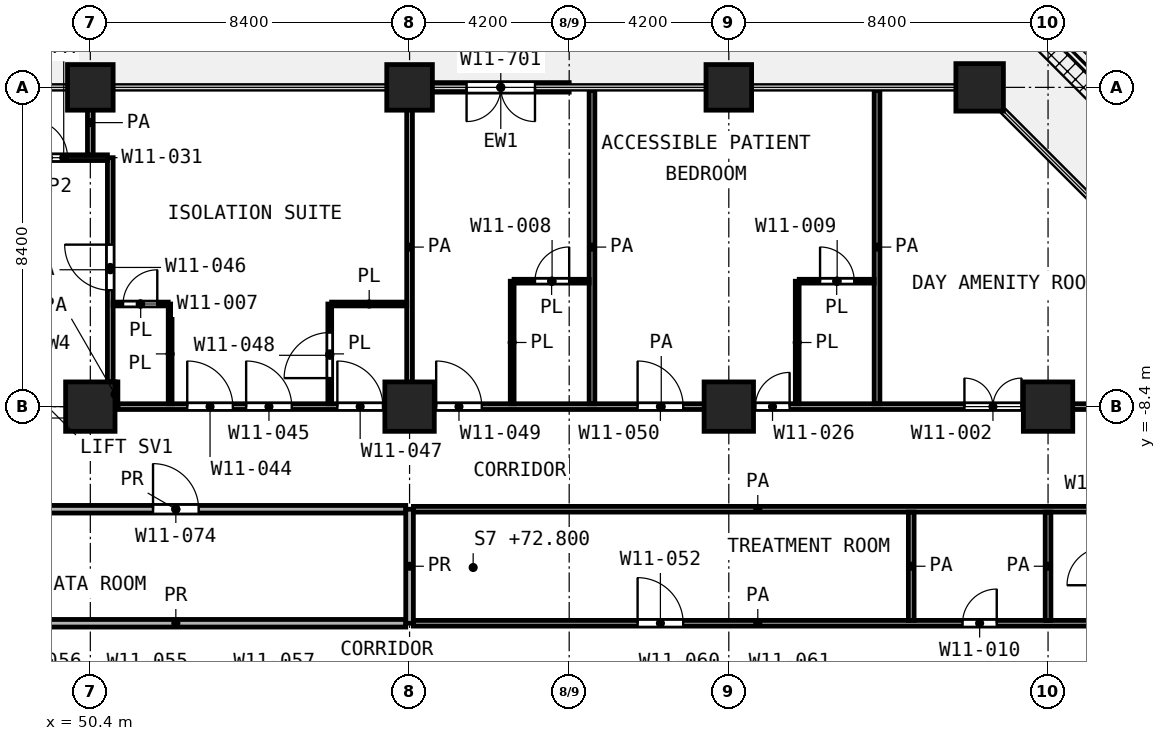
"""IFC4 building model, lengths in metres.
Left out: names, types, materials, properties, quantities, classifications, styles, units other than length and angle.
Written with IfcOpenShell. Run it as: python <this file> out.ifc"""

import sys

from ifc_helpers import new_model, si_unit, direction, frame, frame_2d, origin, origin_2d, place, context, subcontext, project, spatial, rectangle, extrude, element, fill, save


model = new_model("IFC4")
c1 = context("Model", 3, precision=1e-05, world=origin(), true_north=direction((0.0, 1.0)))
c2 = subcontext(c1, "Body", "Model", "MODEL_VIEW")
j1 = project(units=[si_unit("LENGTHUNIT", "METRE"), si_unit("PLANEANGLEUNIT", "RADIAN")], contexts=[c1])
p1 = place(None, origin())
s1 = spatial("IfcSite", under=j1, at=p1, CompositionType="ELEMENT")
p2 = place(p1, origin())
s2 = spatial("IfcBuilding", under=s1, at=p2, CompositionType="ELEMENT")
p3 = place(p2, frame((0.0, 0.0, 72.8)))
s3 = spatial("IfcBuildingStorey", under=s2, at=p3, CompositionType="ELEMENT", Elevation=72.8)
for number, where, z_axis, x_axis in (
    (1, (50.4, 0.0, 0.0), (0.0, 0.0, 1.0), (1.0, 0.0, 0.0)),
    (2, (58.8, 0.0, 0.0), (0.0, 0.0, 1.0), (1.0, 0.0, 0.0)),
    (3, (67.2, 0.0, 0.0), (0.0, 0.0, 1.0), (1.0, 0.0, 0.0)),
):
    element("IfcColumn", number, at=place(p3, frame(where, z_axis=z_axis, x_axis=x_axis)), inside=s3, PredefinedType="COLUMN", context=c2, shape_type="SweptSolid", body=[
        extrude(rectangle(XDim=1.2, YDim=1.2, at=origin_2d()), origin(), (0.0, 0.0, 1.0), 4.2),
    ])
p4 = place(p3, frame((73.8, 0.0, 0.0), z_axis=(0.0, 0.0, 1.0), x_axis=(1.0, 0.0, 0.0)))
e4 = element("IfcColumn", 4, at=p4, inside=s3, PredefinedType="COLUMN", context=c2, shape_type="SweptSolid", body=[
    extrude(rectangle(XDim=1.25, YDim=1.25, at=origin_2d()), origin(), (0.0, 0.0, 1.0), 4.2),
])
for number, where, z_axis, x_axis in (
    (5, (50.4, -8.4, 0.0), (0.0, 0.0, 1.0), (1.0, 0.0, 0.0)),
    (6, (58.8, -8.4, 0.0), (0.0, 0.0, 1.0), (1.0, 0.0, 0.0)),
    (7, (67.2, -8.4, 0.0), (0.0, 0.0, 1.0), (1.0, 0.0, 0.0)),
    (8, (75.6, -8.4, 0.0), (0.0, 0.0, 1.0), (1.0, 0.0, 0.0)),
):
    element("IfcColumn", number, at=place(p3, frame(where, z_axis=z_axis, x_axis=x_axis)), inside=s3, PredefinedType="COLUMN", context=c2, shape_type="SweptSolid", body=[
        extrude(rectangle(XDim=1.3, YDim=1.3, at=origin_2d()), origin(), (0.0, 0.0, 1.0), 4.2),
    ])
p5 = place(p3, frame((63.0, 0.0, 0.0), z_axis=(0.0, 0.0, 1.0), x_axis=(-1.0, 0.0, 0.0)))
e9 = element("IfcWall", 9, at=p5, inside=s3, PredefinedType="SOLIDWALL", context=c2, shape_type="SweptSolid", body=[
    extrude(rectangle(XDim=3.6, YDim=0.25, at=frame_2d((1.8, 0.0))), origin(), (0.0, 0.0, 1.0), 3.78),
])
p6 = place(p5, frame((0.9, 0.0, 0.0)))
e10 = element("IfcOpeningElement", 10, at=p6, cuts=e9, PredefinedType="OPENING", context=c2, shape_type="SweptSolid", body=[
    extrude(rectangle(XDim=1.8, YDim=2.1, at=frame_2d((0.9, 1.05))), frame((0.0, 0.135, 0.0), z_axis=(0.0, -1.0, 0.0), x_axis=(1.0, 0.0, 0.0)), (0.0, 0.0, 1.0), 0.27),
])
p7 = place(p3, frame((51.0, -5.7, 0.0), z_axis=(0.0, 0.0, 1.0), x_axis=(1.0, 0.0, 0.0)))
e11 = element("IfcWall", 11, at=p7, inside=s3, PredefinedType="PARTITIONING", context=c2, shape_type="SweptSolid", body=[
    extrude(rectangle(XDim=1.45, YDim=0.1, at=frame_2d((0.725, 0.0))), origin(), (0.0, 0.0, 1.0), 3.9),
])
p8 = place(p7, frame((0.262, 0.0, 0.0)))
e12 = element("IfcOpeningElement", 12, at=p8, cuts=e11, PredefinedType="OPENING", context=c2, shape_type="SweptSolid", body=[
    extrude(rectangle(XDim=0.9, YDim=2.1, at=frame_2d((0.45, 1.05))), frame((0.0, 0.06, 0.0), z_axis=(0.0, -1.0, 0.0), x_axis=(1.0, 0.0, 0.0)), (0.0, 0.0, 1.0), 0.12),
])
p9 = place(p3, frame((56.75, -5.7, 0.0), z_axis=(0.0, 0.0, 1.0), x_axis=(1.0, 0.0, 0.0)))
e13 = element("IfcWall", 13, at=p9, inside=s3, PredefinedType="PARTITIONING", context=c2, shape_type="SweptSolid", body=[
    extrude(rectangle(XDim=1.975, YDim=0.1, at=frame_2d((0.988, 0.0))), origin(), (0.0, 0.0, 1.0), 3.9),
])
p10 = place(p3, frame((61.55, -5.1, 0.0), z_axis=(0.0, 0.0, 1.0), x_axis=(1.0, 0.0, 0.0)))
e14 = element("IfcWall", 14, at=p10, inside=s3, PredefinedType="PARTITIONING", context=c2, shape_type="SweptSolid", body=[
    extrude(rectangle(XDim=1.975, YDim=0.1, at=frame_2d((0.987, 0.0))), origin(), (0.0, 0.0, 1.0), 3.9),
])
p11 = place(p10, frame((0.55, 0.0, 0.0)))
e15 = element("IfcOpeningElement", 15, at=p11, cuts=e14, PredefinedType="OPENING", context=c2, shape_type="SweptSolid", body=[
    extrude(rectangle(XDim=0.9, YDim=2.1, at=frame_2d((0.45, 1.05))), frame((0.0, 0.06, 0.0), z_axis=(0.0, -1.0, 0.0), x_axis=(1.0, 0.0, 0.0)), (0.0, 0.0, 1.0), 0.12),
])
p12 = place(p3, frame((69.052, -5.1, 0.0), z_axis=(0.0, 0.0, 1.0), x_axis=(1.0, 0.0, 0.0)))
e16 = element("IfcWall", 16, at=p12, inside=s3, PredefinedType="PARTITIONING", context=c2, shape_type="SweptSolid", body=[
    extrude(rectangle(XDim=1.973, YDim=0.1, at=frame_2d((0.986, 0.0))), origin(), (0.0, 0.0, 1.0), 3.9),
])
p13 = place(p12, frame((0.549, 0.0, 0.0)))
e17 = element("IfcOpeningElement", 17, at=p13, cuts=e16, PredefinedType="OPENING", context=c2, shape_type="SweptSolid", body=[
    extrude(rectangle(XDim=0.9, YDim=2.1, at=frame_2d((0.45, 1.05))), frame((0.0, 0.06, 0.0), z_axis=(0.0, -1.0, 0.0), x_axis=(1.0, 0.0, 0.0)), (0.0, 0.0, 1.0), 0.12),
])
p14 = place(p3, frame((52.5, -8.325, 0.0), z_axis=(0.0, 0.0, 1.0), x_axis=(0.0, 1.0, 0.0)))
e18 = element("IfcWall", 18, at=p14, inside=s3, PredefinedType="PARTITIONING", context=c2, shape_type="SweptSolid", body=[
    extrude(rectangle(XDim=2.625, YDim=0.1, at=frame_2d((1.312, 0.0))), origin(), (0.0, 0.0, 1.0), 3.9),
])
p15 = place(p3, frame((56.7, -8.325, 0.0), z_axis=(0.0, 0.0, 1.0), x_axis=(0.0, 1.0, 0.0)))
e19 = element("IfcWall", 19, at=p15, inside=s3, PredefinedType="PARTITIONING", context=c2, shape_type="SweptSolid", body=[
    extrude(rectangle(XDim=2.625, YDim=0.1, at=frame_2d((1.312, 0.0))), origin(), (0.0, 0.0, 1.0), 3.9),
])
p16 = place(p15, frame((0.675, 0.0, 0.0)))
e20 = element("IfcOpeningElement", 20, at=p16, cuts=e19, PredefinedType="OPENING", context=c2, shape_type="SweptSolid", body=[
    extrude(rectangle(XDim=1.2, YDim=2.1, at=frame_2d((0.6, 1.05))), frame((0.0, 0.06, 0.0), z_axis=(0.0, -1.0, 0.0), x_axis=(1.0, 0.0, 0.0)), (0.0, 0.0, 1.0), 0.12),
])
p17 = place(p3, frame((61.5, -8.325, 0.0), z_axis=(0.0, 0.0, 1.0), x_axis=(0.0, 1.0, 0.0)))
e21 = element("IfcWall", 21, at=p17, inside=s3, PredefinedType="PARTITIONING", context=c2, shape_type="SweptSolid", body=[
    extrude(rectangle(XDim=3.225, YDim=0.1, at=frame_2d((1.612, 0.0))), origin(), (0.0, 0.0, 1.0), 3.9),
])
p18 = place(p3, frame((69.0, -8.325, 0.0), z_axis=(0.0, 0.0, 1.0), x_axis=(0.0, 1.0, 0.0)))
e22 = element("IfcWall", 22, at=p18, inside=s3, PredefinedType="PARTITIONING", context=c2, shape_type="SweptSolid", body=[
    extrude(rectangle(XDim=3.224, YDim=0.1, at=frame_2d((1.612, 0.0))), origin(), (0.0, 0.0, 1.0), 3.9),
])
p19 = place(p3, frame((58.9, -14.1, 0.0), z_axis=(0.0, 0.0, 1.0), x_axis=(1.0, 0.0, 0.0)))
e23 = element("IfcWall", 23, at=p19, inside=s3, PredefinedType="PARTITIONING", context=c2, shape_type="SweptSolid", body=[
    extrude(rectangle(XDim=18.125, YDim=0.15, at=frame_2d((9.062, 0.0))), origin(), (0.0, 0.0, 1.0), 3.9),
])
p20 = place(p19, frame((5.9, 0.0, 0.0)))
e24 = element("IfcOpeningElement", 24, at=p20, cuts=e23, PredefinedType="OPENING", context=c2, shape_type="SweptSolid", body=[
    extrude(rectangle(XDim=1.2, YDim=2.1, at=frame_2d((0.6, 1.05))), frame((0.0, 0.085, 0.0), z_axis=(0.0, -1.0, 0.0), x_axis=(1.0, 0.0, 0.0)), (0.0, 0.0, 1.0), 0.17),
])
p21 = place(p19, frame((14.45, 0.0, 0.0)))
e25 = element("IfcOpeningElement", 25, at=p21, cuts=e23, PredefinedType="OPENING", context=c2, shape_type="SweptSolid", body=[
    extrude(rectangle(XDim=0.9, YDim=2.1, at=frame_2d((0.45, 1.05))), frame((0.0, 0.085, 0.0), z_axis=(0.0, -1.0, 0.0), x_axis=(1.0, 0.0, 0.0)), (0.0, 0.0, 1.0), 0.17),
])
p22 = place(p3, frame((58.9, -11.1, 0.0), z_axis=(0.0, 0.0, 1.0), x_axis=(1.0, 0.0, 0.0)))
e26 = element("IfcWall", 26, at=p22, inside=s3, PredefinedType="PARTITIONING", context=c2, shape_type="SweptSolid", body=[
    extrude(rectangle(XDim=18.125, YDim=0.15, at=frame_2d((9.062, 0.0))), origin(), (0.0, 0.0, 1.0), 3.9),
])
p23 = place(p3, frame((51.125, -8.4, 0.0), z_axis=(0.0, 0.0, 1.0), x_axis=(1.0, 0.0, 0.0)))
e27 = element("IfcWall", 27, at=p23, inside=s3, PredefinedType="PARTITIONING", context=c2, shape_type="SweptSolid", body=[
    extrude(rectangle(XDim=28.595, YDim=0.15, at=frame_2d((14.297, 0.0))), origin(), (0.0, 0.0, 1.0), 3.9),
])
p24 = place(p23, frame((1.825, 0.0, 0.0)))
e28 = element("IfcOpeningElement", 28, at=p24, cuts=e27, PredefinedType="OPENING", context=c2, shape_type="SweptSolid", body=[
    extrude(rectangle(XDim=1.2, YDim=2.1, at=frame_2d((0.6, 1.05))), frame((0.0, 0.085, 0.0), z_axis=(0.0, -1.0, 0.0), x_axis=(1.0, 0.0, 0.0)), (0.0, 0.0, 1.0), 0.17),
])
p25 = place(p23, frame((3.375, 0.0, 0.0)))
e29 = element("IfcOpeningElement", 29, at=p25, cuts=e27, PredefinedType="OPENING", context=c2, shape_type="SweptSolid", body=[
    extrude(rectangle(XDim=1.2, YDim=2.1, at=frame_2d((0.6, 1.05))), frame((0.0, 0.085, 0.0), z_axis=(0.0, -1.0, 0.0), x_axis=(1.0, 0.0, 0.0)), (0.0, 0.0, 1.0), 0.17),
])
p26 = place(p23, frame((5.775, 0.0, 0.0)))
e30 = element("IfcOpeningElement", 30, at=p26, cuts=e27, PredefinedType="OPENING", context=c2, shape_type="SweptSolid", body=[
    extrude(rectangle(XDim=1.2, YDim=2.1, at=frame_2d((0.6, 1.05))), frame((0.0, 0.085, 0.0), z_axis=(0.0, -1.0, 0.0), x_axis=(1.0, 0.0, 0.0)), (0.0, 0.0, 1.0), 0.17),
])
p27 = place(p23, frame((8.375, 0.0, 0.0)))
e31 = element("IfcOpeningElement", 31, at=p27, cuts=e27, PredefinedType="OPENING", context=c2, shape_type="SweptSolid", body=[
    extrude(rectangle(XDim=1.2, YDim=2.1, at=frame_2d((0.6, 1.05))), frame((0.0, 0.085, 0.0), z_axis=(0.0, -1.0, 0.0), x_axis=(1.0, 0.0, 0.0)), (0.0, 0.0, 1.0), 0.17),
])
p28 = place(p23, frame((13.675, 0.0, 0.0)))
e32 = element("IfcOpeningElement", 32, at=p28, cuts=e27, PredefinedType="OPENING", context=c2, shape_type="SweptSolid", body=[
    extrude(rectangle(XDim=1.2, YDim=2.1, at=frame_2d((0.6, 1.05))), frame((0.0, 0.085, 0.0), z_axis=(0.0, -1.0, 0.0), x_axis=(1.0, 0.0, 0.0)), (0.0, 0.0, 1.0), 0.17),
])
p29 = place(p23, frame((16.775, 0.0, 0.0)))
e33 = element("IfcOpeningElement", 33, at=p29, cuts=e27, PredefinedType="OPENING", context=c2, shape_type="SweptSolid", body=[
    extrude(rectangle(XDim=0.9, YDim=2.1, at=frame_2d((0.45, 1.05))), frame((0.0, 0.085, 0.0), z_axis=(0.0, -1.0, 0.0), x_axis=(1.0, 0.0, 0.0)), (0.0, 0.0, 1.0), 0.17),
])
p30 = place(p23, frame((22.275, 0.0, 0.0)))
e34 = element("IfcOpeningElement", 34, at=p30, cuts=e27, PredefinedType="OPENING", context=c2, shape_type="SweptSolid", body=[
    extrude(rectangle(XDim=1.5, YDim=2.1, at=frame_2d((0.75, 1.05))), frame((0.0, 0.085, 0.0), z_axis=(0.0, -1.0, 0.0), x_axis=(1.0, 0.0, 0.0)), (0.0, 0.0, 1.0), 0.17),
])
p31 = place(p3, frame((48.55, -1.85, 0.0), z_axis=(0.0, 0.0, 1.0), x_axis=(1.0, 0.0, 0.0)))
e35 = element("IfcWall", 35, at=p31, inside=s3, PredefinedType="PARTITIONING", context=c2, shape_type="SweptSolid", body=[
    extrude(rectangle(XDim=2.3, YDim=0.15, at=frame_2d((1.15, 0.0))), origin(), (0.0, 0.0, 1.0), 3.9),
])
p32 = place(p31, frame((0.25, 0.0, 0.0)))
e36 = element("IfcOpeningElement", 36, at=p32, cuts=e35, PredefinedType="OPENING", context=c2, shape_type="SweptSolid", body=[
    extrude(rectangle(XDim=1.0, YDim=2.1, at=frame_2d((0.5, 1.05))), frame((0.0, 0.085, 0.0), z_axis=(0.0, -1.0, 0.0), x_axis=(1.0, 0.0, 0.0)), (0.0, 0.0, 1.0), 0.17),
])
p33 = place(p3, frame((50.4, -1.775, 0.0), z_axis=(0.0, 0.0, 1.0), x_axis=(0.0, 1.0, 0.0)))
e37 = element("IfcWall", 37, at=p33, inside=s3, PredefinedType="PARTITIONING", context=c2, shape_type="SweptSolid", body=[
    extrude(rectangle(XDim=1.695, YDim=0.15, at=frame_2d((0.847, 0.0))), origin(), (0.0, 0.0, 1.0), 3.9),
])
p34 = place(p3, frame((50.925, -7.748, 0.0), z_axis=(0.0, 0.0, 1.0), x_axis=(0.0, 1.0, 0.0)))
e38 = element("IfcWall", 38, at=p34, inside=s3, PredefinedType="PARTITIONING", context=c2, shape_type="SweptSolid", body=[
    extrude(rectangle(XDim=5.898, YDim=0.15, at=frame_2d((2.949, 0.0))), origin(), (0.0, 0.0, 1.0), 3.9),
])
p35 = place(p34, frame((2.41, 0.0, 0.0)))
e39 = element("IfcOpeningElement", 39, at=p35, cuts=e38, PredefinedType="OPENING", context=c2, shape_type="SweptSolid", body=[
    extrude(rectangle(XDim=1.2, YDim=2.1, at=frame_2d((0.6, 1.05))), frame((0.0, 0.085, 0.0), z_axis=(0.0, -1.0, 0.0), x_axis=(1.0, 0.0, 0.0)), (0.0, 0.0, 1.0), 0.17),
])
p36 = place(p3, frame((51.05, -8.4, 0.0), z_axis=(0.0, 0.0, 1.0), x_axis=(0.0, 1.0, 0.0)))
e40 = element("IfcWall", 40, at=p36, inside=s3, PredefinedType="PARTITIONING", context=c2, shape_type="SweptSolid", body=[
    extrude(rectangle(XDim=0.65, YDim=0.15, at=frame_2d((0.325, 0.0))), origin(), (0.0, 0.0, 1.0), 3.9),
])
for number, where, z_axis, x_axis in (
    (41, (58.8, -8.325, 0.0), (0.0, 0.0, 1.0), (0.0, 1.0, 0.0)),
    (42, (63.6, -8.325, 0.0), (0.0, 0.0, 1.0), (0.0, 1.0, 0.0)),
    (43, (71.1, -8.325, 0.0), (0.0, 0.0, 1.0), (0.0, 1.0, 0.0)),
):
    element("IfcWall", number, at=place(p3, frame(where, z_axis=z_axis, x_axis=x_axis)), inside=s3, PredefinedType="PARTITIONING", context=c2, shape_type="SweptSolid", body=[
        extrude(rectangle(XDim=8.245, YDim=0.15, at=frame_2d((4.123, 0.0))), origin(), (0.0, 0.0, 1.0), 3.9),
    ])
for number, where, z_axis, x_axis in (
    (44, (72.0, -14.025, 0.0), (0.0, 0.0, 1.0), (0.0, 1.0, 0.0)),
    (45, (75.6, -14.025, 0.0), (0.0, 0.0, 1.0), (0.0, 1.0, 0.0)),
):
    element("IfcWall", number, at=place(p3, frame(where, z_axis=z_axis, x_axis=x_axis)), inside=s3, PredefinedType="PARTITIONING", context=c2, shape_type="SweptSolid", body=[
        extrude(rectangle(XDim=2.85, YDim=0.15, at=frame_2d((1.425, 0.0))), origin(), (0.0, 0.0, 1.0), 3.9),
    ])
p37 = place(p3, frame((46.6, -14.1, 0.0), z_axis=(0.0, 0.0, 1.0), x_axis=(1.0, 0.0, 0.0)))
e46 = element("IfcWall", 46, at=p37, inside=s3, PredefinedType="PARTITIONING", context=c2, shape_type="SweptSolid", body=[
    extrude(rectangle(XDim=12.1, YDim=0.2, at=frame_2d((6.05, 0.0))), origin(), (0.0, 0.0, 1.0), 3.9),
])
p38 = place(p3, frame((46.6, -11.1, 0.0), z_axis=(0.0, 0.0, 1.0), x_axis=(1.0, 0.0, 0.0)))
e47 = element("IfcWall", 47, at=p38, inside=s3, PredefinedType="PARTITIONING", context=c2, shape_type="SweptSolid", body=[
    extrude(rectangle(XDim=12.1, YDim=0.2, at=frame_2d((6.05, 0.0))), origin(), (0.0, 0.0, 1.0), 3.9),
])
p39 = place(p38, frame((5.45, 0.0, 0.0)))
e48 = element("IfcOpeningElement", 48, at=p39, cuts=e47, PredefinedType="OPENING", context=c2, shape_type="SweptSolid", body=[
    extrude(rectangle(XDim=1.2, YDim=2.1, at=frame_2d((0.6, 1.05))), frame((0.0, 0.11, 0.0), z_axis=(0.0, -1.0, 0.0), x_axis=(1.0, 0.0, 0.0)), (0.0, 0.0, 1.0), 0.22),
])
p40 = place(p3, frame((58.8, -14.1, 0.0), z_axis=(0.0, 0.0, 1.0), x_axis=(0.0, 1.0, 0.0)))
e49 = element("IfcWall", 49, at=p40, inside=s3, PredefinedType="PARTITIONING", context=c2, shape_type="SweptSolid", body=[
    extrude(rectangle(XDim=3.0, YDim=0.2, at=frame_2d((1.5, 0.0))), origin(), (0.0, 0.0, 1.0), 3.9),
])
p41 = place(p6, origin())
e50 = element("IfcDoor", 50, at=p41, inside=s3, OperationType="DOUBLE_DOOR_SINGLE_SWING", PredefinedType="DOOR", context=c2, shape_type="SweptSolid", body=[
    extrude(rectangle(XDim=1.8, YDim=2.1, at=frame_2d((0.9, 1.05))), frame((0.0, 0.025, 0.0), z_axis=(0.0, -1.0, 0.0), x_axis=(1.0, 0.0, 0.0)), (0.0, 0.0, 1.0), 0.05),
])
fill(e10, e50)
p42 = place(p32, origin())
e51 = element("IfcDoor", 51, at=p42, inside=s3, OperationType="SINGLE_SWING_LEFT", PredefinedType="DOOR", context=c2, shape_type="SweptSolid", body=[
    extrude(rectangle(XDim=1.0, YDim=2.1, at=frame_2d((0.5, 1.05))), frame((0.0, 0.025, 0.0), z_axis=(0.0, -1.0, 0.0), x_axis=(1.0, 0.0, 0.0)), (0.0, 0.0, 1.0), 0.05),
])
fill(e36, e51)
p43 = place(p24, origin())
e52 = element("IfcDoor", 52, at=p43, inside=s3, OperationType="SINGLE_SWING_LEFT", PredefinedType="DOOR", context=c2, shape_type="SweptSolid", body=[
    extrude(rectangle(XDim=1.2, YDim=2.1, at=frame_2d((0.6, 1.05))), frame((0.0, 0.025, 0.0), z_axis=(0.0, -1.0, 0.0), x_axis=(1.0, 0.0, 0.0)), (0.0, 0.0, 1.0), 0.05),
])
fill(e28, e52)
p44 = place(p25, origin())
e53 = element("IfcDoor", 53, at=p44, inside=s3, OperationType="SINGLE_SWING_LEFT", PredefinedType="DOOR", context=c2, shape_type="SweptSolid", body=[
    extrude(rectangle(XDim=1.2, YDim=2.1, at=frame_2d((0.6, 1.05))), frame((0.0, 0.025, 0.0), z_axis=(0.0, -1.0, 0.0), x_axis=(1.0, 0.0, 0.0)), (0.0, 0.0, 1.0), 0.05),
])
fill(e29, e53)
p45 = place(p35, origin())
e54 = element("IfcDoor", 54, at=p45, inside=s3, OperationType="SINGLE_SWING_RIGHT", PredefinedType="DOOR", context=c2, shape_type="SweptSolid", body=[
    extrude(rectangle(XDim=1.2, YDim=2.1, at=frame_2d((0.6, 1.05))), frame((0.0, 0.025, 0.0), z_axis=(0.0, -1.0, 0.0), x_axis=(1.0, 0.0, 0.0)), (0.0, 0.0, 1.0), 0.05),
])
fill(e39, e54)
p46 = place(p26, origin())
e55 = element("IfcDoor", 55, at=p46, inside=s3, OperationType="SINGLE_SWING_LEFT", PredefinedType="DOOR", context=c2, shape_type="SweptSolid", body=[
    extrude(rectangle(XDim=1.2, YDim=2.1, at=frame_2d((0.6, 1.05))), frame((0.0, 0.025, 0.0), z_axis=(0.0, -1.0, 0.0), x_axis=(1.0, 0.0, 0.0)), (0.0, 0.0, 1.0), 0.05),
])
fill(e30, e55)
p47 = place(p16, origin())
e56 = element("IfcDoor", 56, at=p47, inside=s3, OperationType="SINGLE_SWING_LEFT", PredefinedType="DOOR", context=c2, shape_type="SweptSolid", body=[
    extrude(rectangle(XDim=1.2, YDim=2.1, at=frame_2d((0.6, 1.05))), frame((0.0, 0.025, 0.0), z_axis=(0.0, -1.0, 0.0), x_axis=(1.0, 0.0, 0.0)), (0.0, 0.0, 1.0), 0.05),
])
fill(e20, e56)
p48 = place(p8, origin())
e57 = element("IfcDoor", 57, at=p48, inside=s3, OperationType="SINGLE_SWING_RIGHT", PredefinedType="DOOR", context=c2, shape_type="SweptSolid", body=[
    extrude(rectangle(XDim=0.9, YDim=2.1, at=frame_2d((0.45, 1.05))), frame((0.0, 0.025, 0.0), z_axis=(0.0, -1.0, 0.0), x_axis=(1.0, 0.0, 0.0)), (0.0, 0.0, 1.0), 0.05),
])
fill(e12, e57)
p49 = place(p27, origin())
e58 = element("IfcDoor", 58, at=p49, inside=s3, OperationType="SINGLE_SWING_LEFT", PredefinedType="DOOR", context=c2, shape_type="SweptSolid", body=[
    extrude(rectangle(XDim=1.2, YDim=2.1, at=frame_2d((0.6, 1.05))), frame((0.0, 0.025, 0.0), z_axis=(0.0, -1.0, 0.0), x_axis=(1.0, 0.0, 0.0)), (0.0, 0.0, 1.0), 0.05),
])
fill(e31, e58)
p50 = place(p11, origin())
e59 = element("IfcDoor", 59, at=p50, inside=s3, OperationType="SINGLE_SWING_RIGHT", PredefinedType="DOOR", context=c2, shape_type="SweptSolid", body=[
    extrude(rectangle(XDim=0.9, YDim=2.1, at=frame_2d((0.45, 1.05))), frame((0.0, 0.025, 0.0), z_axis=(0.0, -1.0, 0.0), x_axis=(1.0, 0.0, 0.0)), (0.0, 0.0, 1.0), 0.05),
])
fill(e15, e59)
p51 = place(p28, origin())
e60 = element("IfcDoor", 60, at=p51, inside=s3, OperationType="SINGLE_SWING_LEFT", PredefinedType="DOOR", context=c2, shape_type="SweptSolid", body=[
    extrude(rectangle(XDim=1.2, YDim=2.1, at=frame_2d((0.6, 1.05))), frame((0.0, 0.025, 0.0), z_axis=(0.0, -1.0, 0.0), x_axis=(1.0, 0.0, 0.0)), (0.0, 0.0, 1.0), 0.05),
])
fill(e32, e60)
p52 = place(p29, origin())
e61 = element("IfcDoor", 61, at=p52, inside=s3, OperationType="SINGLE_SWING_RIGHT", PredefinedType="DOOR", context=c2, shape_type="SweptSolid", body=[
    extrude(rectangle(XDim=0.9, YDim=2.1, at=frame_2d((0.45, 1.05))), frame((0.0, 0.025, 0.0), z_axis=(0.0, -1.0, 0.0), x_axis=(1.0, 0.0, 0.0)), (0.0, 0.0, 1.0), 0.05),
])
fill(e33, e61)
p53 = place(p13, origin())
e62 = element("IfcDoor", 62, at=p53, inside=s3, OperationType="SINGLE_SWING_LEFT", PredefinedType="DOOR", context=c2, shape_type="SweptSolid", body=[
    extrude(rectangle(XDim=0.9, YDim=2.1, at=frame_2d((0.45, 1.05))), frame((0.0, 0.025, 0.0), z_axis=(0.0, -1.0, 0.0), x_axis=(1.0, 0.0, 0.0)), (0.0, 0.0, 1.0), 0.05),
])
fill(e17, e62)
p54 = place(p30, origin())
e63 = element("IfcDoor", 63, at=p54, inside=s3, OperationType="DOUBLE_DOOR_SINGLE_SWING", PredefinedType="DOOR", context=c2, shape_type="SweptSolid", body=[
    extrude(rectangle(XDim=1.5, YDim=2.1, at=frame_2d((0.75, 1.05))), frame((0.0, 0.025, 0.0), z_axis=(0.0, -1.0, 0.0), x_axis=(1.0, 0.0, 0.0)), (0.0, 0.0, 1.0), 0.05),
])
fill(e34, e63)
p55 = place(p39, origin())
e64 = element("IfcDoor", 64, at=p55, inside=s3, OperationType="SINGLE_SWING_LEFT", PredefinedType="DOOR", context=c2, shape_type="SweptSolid", body=[
    extrude(rectangle(XDim=1.2, YDim=2.1, at=frame_2d((0.6, 1.05))), frame((0.0, 0.025, 0.0), z_axis=(0.0, -1.0, 0.0), x_axis=(1.0, 0.0, 0.0)), (0.0, 0.0, 1.0), 0.05),
])
fill(e48, e64)
p56 = place(p20, origin())
e65 = element("IfcDoor", 65, at=p56, inside=s3, OperationType="SINGLE_SWING_LEFT", PredefinedType="DOOR", context=c2, shape_type="SweptSolid", body=[
    extrude(rectangle(XDim=1.2, YDim=2.1, at=frame_2d((0.6, 1.05))), frame((0.0, 0.025, 0.0), z_axis=(0.0, -1.0, 0.0), x_axis=(1.0, 0.0, 0.0)), (0.0, 0.0, 1.0), 0.05),
])
fill(e24, e65)
p57 = place(p21, origin())
e66 = element("IfcDoor", 66, at=p57, inside=s3, OperationType="SINGLE_SWING_RIGHT", PredefinedType="DOOR", context=c2, shape_type="SweptSolid", body=[
    extrude(rectangle(XDim=0.9, YDim=2.1, at=frame_2d((0.45, 1.05))), frame((0.0, 0.025, 0.0), z_axis=(0.0, -1.0, 0.0), x_axis=(1.0, 0.0, 0.0)), (0.0, 0.0, 1.0), 0.05),
])
fill(e25, e66)
save(model, sys.argv[1])
